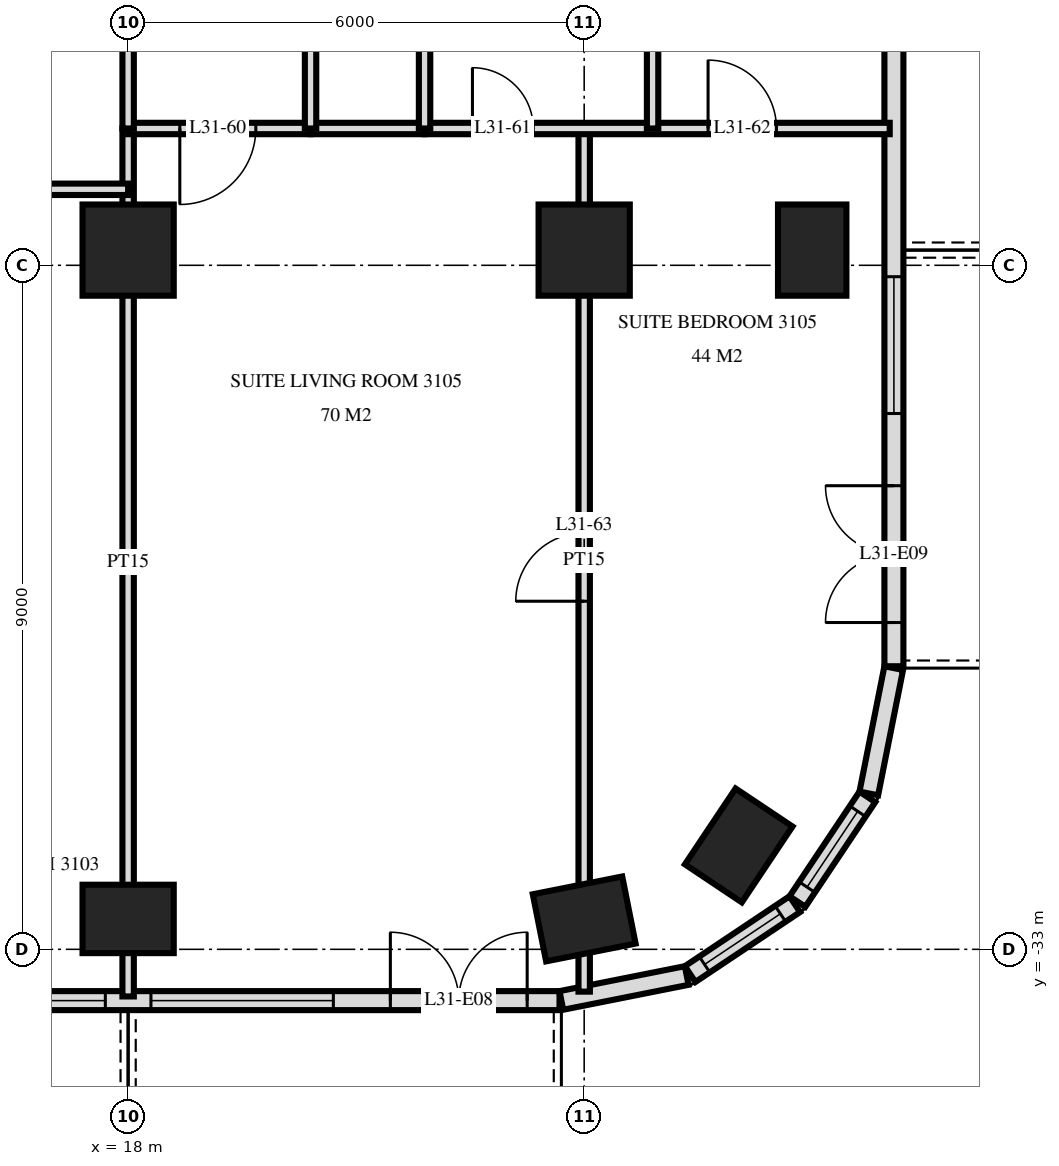
"""IFC4 building model, lengths in metres.
Left out: names, types, materials, properties, quantities, classifications, styles, units other than length and angle.
Written with IfcOpenShell. Run it as: python <this file> out.ifc"""

import sys

from ifc_helpers import new_model, si_unit, direction, frame, frame_2d, origin, origin_2d, place, context, subcontext, project, spatial, rectangle, extrude, element, fill, save


model = new_model("IFC4")
c1 = context("Model", 3, precision=1e-05, world=origin(), true_north=direction((0.0, 1.0)))
c2 = subcontext(c1, "Body", "Model", "MODEL_VIEW")
j1 = project(units=[si_unit("LENGTHUNIT", "METRE"), si_unit("PLANEANGLEUNIT", "RADIAN")], contexts=[c1])
p1 = place(None, origin())
s1 = spatial("IfcSite", under=j1, at=p1, CompositionType="ELEMENT")
p2 = place(p1, origin())
s2 = spatial("IfcBuilding", under=s1, at=p2, CompositionType="ELEMENT")
p3 = place(p2, frame((0.0, 0.0, 123.6)))
s3 = spatial("IfcBuildingStorey", under=s2, at=p3, CompositionType="ELEMENT", Elevation=123.6)
p4 = place(p3, frame((18.0, -32.6, 0.0), z_axis=(0.0, 0.0, 1.0), x_axis=(1.0, 0.0, 0.0)))
e1 = element("IfcColumn", 1, at=p4, inside=s3, PredefinedType="COLUMN", context=c2, shape_type="SweptSolid", body=[
    extrude(rectangle(XDim=1.2, YDim=0.9, at=origin_2d()), origin(), (0.0, 0.0, 1.0), 3.6),
])
p5 = place(p3, frame((18.0, -23.8, 0.0), z_axis=(0.0, 0.0, 1.0), x_axis=(1.0, 0.0, 0.0)))
e2 = element("IfcColumn", 2, at=p5, inside=s3, PredefinedType="COLUMN", context=c2, shape_type="SweptSolid", body=[
    extrude(rectangle(XDim=1.2, YDim=1.2, at=origin_2d()), origin(), (0.0, 0.0, 1.0), 3.6),
])
p6 = place(p3, frame((24.0, -32.6, 0.0), z_axis=(0.0, 0.0, 1.0), x_axis=(0.980792089743, 0.195056086032, 0.0)))
e3 = element("IfcColumn", 3, at=p6, inside=s3, PredefinedType="COLUMN", context=c2, shape_type="SweptSolid", body=[
    extrude(rectangle(XDim=1.2, YDim=0.9, at=origin_2d()), origin(), (0.0, 0.0, 1.0), 3.6),
])
p7 = place(p3, frame((24.0, -23.8, 0.0), z_axis=(0.0, 0.0, 1.0), x_axis=(1.0, 0.0, 0.0)))
e4 = element("IfcColumn", 4, at=p7, inside=s3, PredefinedType="COLUMN", context=c2, shape_type="SweptSolid", body=[
    extrude(rectangle(XDim=1.2, YDim=1.2, at=origin_2d()), origin(), (0.0, 0.0, 1.0), 3.6),
])
for number, where, z_axis, x_axis in (
    (5, (26.033, -31.633, 0.0), (0.0, 0.0, 1.0), (0.556, 0.831, 0.0)),
    (6, (27.0, -23.8, 0.0), (0.0, 0.0, 1.0), (0.0, 1.0, 0.0)),
):
    element("IfcColumn", number, at=place(p3, frame(where, z_axis=z_axis, x_axis=x_axis)), inside=s3, PredefinedType="COLUMN", context=c2, shape_type="SweptSolid", body=[
        extrude(rectangle(XDim=1.2, YDim=0.9, at=origin_2d()), origin(), (0.0, 0.0, 1.0), 3.6),
    ])
p8 = place(p3, frame((-23.675, -33.675, 0.0), z_axis=(0.0, 0.0, 1.0), x_axis=(1.0, 0.0, 0.0)))
e7 = element("IfcWall", 7, at=p8, inside=s3, PredefinedType="SOLIDWALL", context=c2, shape_type="SweptSolid", body=[
    extrude(rectangle(XDim=47.351, YDim=0.25, at=frame_2d((23.675, 0.0))), origin(), (0.0, 0.0, 1.0), 3.32),
])
p9 = place(p8, frame((3.425, 0.0, 0.0)))
e8 = element("IfcOpeningElement", 8, at=p9, cuts=e7, PredefinedType="OPENING", context=c2, shape_type="SweptSolid", body=[
    extrude(rectangle(XDim=1.8, YDim=2.4, at=frame_2d((0.9, 1.2))), frame((0.0, 0.135, 0.0), z_axis=(0.0, -1.0, 0.0), x_axis=(1.0, 0.0, 0.0)), (0.0, 0.0, 1.0), 0.27),
])
p10 = place(p8, frame((6.275, 0.0, 0.0)))
e9 = element("IfcOpeningElement", 9, at=p10, cuts=e7, PredefinedType="OPENING", context=c2, shape_type="SweptSolid", body=[
    extrude(rectangle(XDim=1.8, YDim=2.4, at=frame_2d((0.9, 1.2))), frame((0.0, 0.135, 0.0), z_axis=(0.0, -1.0, 0.0), x_axis=(1.0, 0.0, 0.0)), (0.0, 0.0, 1.0), 0.27),
])
p11 = place(p8, frame((8.975, 0.0, 0.3)))
e10 = element("IfcOpeningElement", 10, at=p11, cuts=e7, PredefinedType="OPENING", context=c2, shape_type="SweptSolid", body=[
    extrude(rectangle(XDim=2.4, YDim=2.1, at=frame_2d((1.2, 1.05))), frame((0.0, 0.135, 0.0), z_axis=(0.0, -1.0, 0.0), x_axis=(1.0, 0.0, 0.0)), (0.0, 0.0, 1.0), 0.27),
])
p12 = place(p8, frame((12.275, 0.0, 0.0)))
e11 = element("IfcOpeningElement", 11, at=p12, cuts=e7, PredefinedType="OPENING", context=c2, shape_type="SweptSolid", body=[
    extrude(rectangle(XDim=1.8, YDim=2.4, at=frame_2d((0.9, 1.2))), frame((0.0, 0.135, 0.0), z_axis=(0.0, -1.0, 0.0), x_axis=(1.0, 0.0, 0.0)), (0.0, 0.0, 1.0), 0.27),
])
p13 = place(p8, frame((14.975, 0.0, 0.3)))
e12 = element("IfcOpeningElement", 12, at=p13, cuts=e7, PredefinedType="OPENING", context=c2, shape_type="SweptSolid", body=[
    extrude(rectangle(XDim=2.4, YDim=2.1, at=frame_2d((1.2, 1.05))), frame((0.0, 0.135, 0.0), z_axis=(0.0, -1.0, 0.0), x_axis=(1.0, 0.0, 0.0)), (0.0, 0.0, 1.0), 0.27),
])
p14 = place(p8, frame((17.975, 0.0, 0.3)))
e13 = element("IfcOpeningElement", 13, at=p14, cuts=e7, PredefinedType="OPENING", context=c2, shape_type="SweptSolid", body=[
    extrude(rectangle(XDim=2.4, YDim=2.1, at=frame_2d((1.2, 1.05))), frame((0.0, 0.135, 0.0), z_axis=(0.0, -1.0, 0.0), x_axis=(1.0, 0.0, 0.0)), (0.0, 0.0, 1.0), 0.27),
])
p15 = place(p8, frame((21.275, 0.0, 0.0)))
e14 = element("IfcOpeningElement", 14, at=p15, cuts=e7, PredefinedType="OPENING", context=c2, shape_type="SweptSolid", body=[
    extrude(rectangle(XDim=1.8, YDim=2.4, at=frame_2d((0.9, 1.2))), frame((0.0, 0.135, 0.0), z_axis=(0.0, -1.0, 0.0), x_axis=(1.0, 0.0, 0.0)), (0.0, 0.0, 1.0), 0.27),
])
p16 = place(p8, frame((24.275, 0.0, 0.0)))
e15 = element("IfcOpeningElement", 15, at=p16, cuts=e7, PredefinedType="OPENING", context=c2, shape_type="SweptSolid", body=[
    extrude(rectangle(XDim=1.8, YDim=2.4, at=frame_2d((0.9, 1.2))), frame((0.0, 0.135, 0.0), z_axis=(0.0, -1.0, 0.0), x_axis=(1.0, 0.0, 0.0)), (0.0, 0.0, 1.0), 0.27),
])
p17 = place(p8, frame((26.975, 0.0, 0.3)))
e16 = element("IfcOpeningElement", 16, at=p17, cuts=e7, PredefinedType="OPENING", context=c2, shape_type="SweptSolid", body=[
    extrude(rectangle(XDim=2.4, YDim=2.1, at=frame_2d((1.2, 1.05))), frame((0.0, 0.135, 0.0), z_axis=(0.0, -1.0, 0.0), x_axis=(1.0, 0.0, 0.0)), (0.0, 0.0, 1.0), 0.27),
])
p18 = place(p8, frame((30.275, 0.0, 0.0)))
e17 = element("IfcOpeningElement", 17, at=p18, cuts=e7, PredefinedType="OPENING", context=c2, shape_type="SweptSolid", body=[
    extrude(rectangle(XDim=1.8, YDim=2.4, at=frame_2d((0.9, 1.2))), frame((0.0, 0.135, 0.0), z_axis=(0.0, -1.0, 0.0), x_axis=(1.0, 0.0, 0.0)), (0.0, 0.0, 1.0), 0.27),
])
p19 = place(p8, frame((32.975, 0.0, 0.3)))
e18 = element("IfcOpeningElement", 18, at=p19, cuts=e7, PredefinedType="OPENING", context=c2, shape_type="SweptSolid", body=[
    extrude(rectangle(XDim=2.4, YDim=2.1, at=frame_2d((1.2, 1.05))), frame((0.0, 0.135, 0.0), z_axis=(0.0, -1.0, 0.0), x_axis=(1.0, 0.0, 0.0)), (0.0, 0.0, 1.0), 0.27),
])
p20 = place(p8, frame((36.275, 0.0, 0.0)))
e19 = element("IfcOpeningElement", 19, at=p20, cuts=e7, PredefinedType="OPENING", context=c2, shape_type="SweptSolid", body=[
    extrude(rectangle(XDim=1.8, YDim=2.4, at=frame_2d((0.9, 1.2))), frame((0.0, 0.135, 0.0), z_axis=(0.0, -1.0, 0.0), x_axis=(1.0, 0.0, 0.0)), (0.0, 0.0, 1.0), 0.27),
])
p21 = place(p8, frame((38.975, 0.0, 0.3)))
e20 = element("IfcOpeningElement", 20, at=p21, cuts=e7, PredefinedType="OPENING", context=c2, shape_type="SweptSolid", body=[
    extrude(rectangle(XDim=2.4, YDim=2.1, at=frame_2d((1.2, 1.05))), frame((0.0, 0.135, 0.0), z_axis=(0.0, -1.0, 0.0), x_axis=(1.0, 0.0, 0.0)), (0.0, 0.0, 1.0), 0.27),
])
p22 = place(p8, frame((41.975, 0.0, 0.3)))
e21 = element("IfcOpeningElement", 21, at=p22, cuts=e7, PredefinedType="OPENING", context=c2, shape_type="SweptSolid", body=[
    extrude(rectangle(XDim=2.4, YDim=2.1, at=frame_2d((1.2, 1.05))), frame((0.0, 0.135, 0.0), z_axis=(0.0, -1.0, 0.0), x_axis=(1.0, 0.0, 0.0)), (0.0, 0.0, 1.0), 0.27),
])
p23 = place(p8, frame((45.125, 0.0, 0.0)))
e22 = element("IfcOpeningElement", 22, at=p23, cuts=e7, PredefinedType="OPENING", context=c2, shape_type="SweptSolid", body=[
    extrude(rectangle(XDim=1.8, YDim=2.4, at=frame_2d((0.9, 1.2))), frame((0.0, 0.135, 0.0), z_axis=(0.0, -1.0, 0.0), x_axis=(1.0, 0.0, 0.0)), (0.0, 0.0, 1.0), 0.27),
])
p24 = place(p3, frame((23.7, -33.673, 0.0), z_axis=(0.0, 0.0, 1.0), x_axis=(0.980775640221, 0.19513878023, 0.0)))
e23 = element("IfcWall", 23, at=p24, inside=s3, PredefinedType="SOLIDWALL", context=c2, shape_type="SweptSolid", body=[
    extrude(rectangle(XDim=1.681, YDim=0.25, at=frame_2d((0.841, 0.0))), origin(), (0.0, 0.0, 1.0), 3.32),
])
p25 = place(p3, frame((25.394, -33.326, 0.0), z_axis=(0.0, 0.0, 1.0), x_axis=(0.831482937015, 0.55555029066, 0.0)))
e24 = element("IfcWall", 24, at=p25, inside=s3, PredefinedType="SOLIDWALL", context=c2, shape_type="SweptSolid", body=[
    extrude(rectangle(XDim=1.656, YDim=0.25, at=frame_2d((0.828, 0.0))), origin(), (0.0, 0.0, 1.0), 3.32),
])
p26 = place(p25, frame((0.228, 0.0, 0.9)))
e25 = element("IfcOpeningElement", 25, at=p26, cuts=e24, PredefinedType="OPENING", context=c2, shape_type="SweptSolid", body=[
    extrude(rectangle(XDim=1.2, YDim=1.5, at=frame_2d((0.6, 0.75))), frame((0.0, 0.135, 0.0), z_axis=(0.0, -1.0, 0.0), x_axis=(1.0, 0.0, 0.0)), (0.0, 0.0, 1.0), 0.27),
])
p27 = place(p3, frame((26.806, -32.371, 0.0), z_axis=(0.0, 0.0, 1.0), x_axis=(0.55555029066, 0.831482937015, 0.0)))
e26 = element("IfcWall", 26, at=p27, inside=s3, PredefinedType="SOLIDWALL", context=c2, shape_type="SweptSolid", body=[
    extrude(rectangle(XDim=1.656, YDim=0.25, at=frame_2d((0.828, 0.0))), origin(), (0.0, 0.0, 1.0), 3.32),
])
p28 = place(p27, frame((0.228, 0.0, 0.9)))
e27 = element("IfcOpeningElement", 27, at=p28, cuts=e26, PredefinedType="OPENING", context=c2, shape_type="SweptSolid", body=[
    extrude(rectangle(XDim=1.2, YDim=1.5, at=frame_2d((0.6, 0.75))), frame((0.0, 0.135, 0.0), z_axis=(0.0, -1.0, 0.0), x_axis=(1.0, 0.0, 0.0)), (0.0, 0.0, 1.0), 0.27),
])
p29 = place(p3, frame((27.745, -30.949, 0.0), z_axis=(0.0, 0.0, 1.0), x_axis=(0.194999110559, 0.980803419081, 0.0)))
e28 = element("IfcWall", 28, at=p29, inside=s3, PredefinedType="SOLIDWALL", context=c2, shape_type="SweptSolid", body=[
    extrude(rectangle(XDim=1.681, YDim=0.25, at=frame_2d((0.841, 0.0))), origin(), (0.0, 0.0, 1.0), 3.32),
])
p30 = place(p3, frame((28.075, -29.275, 0.0), z_axis=(0.0, 0.0, 1.0), x_axis=(0.0, 1.0, 0.0)))
e29 = element("IfcWall", 29, at=p30, inside=s3, PredefinedType="SOLIDWALL", context=c2, shape_type="SweptSolid", body=[
    extrude(rectangle(XDim=25.951, YDim=0.25, at=frame_2d((12.975, 0.0))), origin(), (0.0, 0.0, 1.0), 3.32),
])
p31 = place(p30, frame((0.575, 0.0, 0.0)))
e30 = element("IfcOpeningElement", 30, at=p31, cuts=e29, PredefinedType="OPENING", context=c2, shape_type="SweptSolid", body=[
    extrude(rectangle(XDim=1.8, YDim=2.4, at=frame_2d((0.9, 1.2))), frame((0.0, 0.135, 0.0), z_axis=(0.0, -1.0, 0.0), x_axis=(1.0, 0.0, 0.0)), (0.0, 0.0, 1.0), 0.27),
])
p32 = place(p30, frame((3.325, 0.0, 0.3)))
e31 = element("IfcOpeningElement", 31, at=p32, cuts=e29, PredefinedType="OPENING", context=c2, shape_type="SweptSolid", body=[
    extrude(rectangle(XDim=1.8, YDim=2.1, at=frame_2d((0.9, 1.05))), frame((0.0, 0.135, 0.0), z_axis=(0.0, -1.0, 0.0), x_axis=(1.0, 0.0, 0.0)), (0.0, 0.0, 1.0), 0.27),
])
p33 = place(p30, frame((8.275, 0.0, 0.0)))
e32 = element("IfcOpeningElement", 32, at=p33, cuts=e29, PredefinedType="OPENING", context=c2, shape_type="SweptSolid", body=[
    extrude(rectangle(XDim=1.8, YDim=2.4, at=frame_2d((0.9, 1.2))), frame((0.0, 0.135, 0.0), z_axis=(0.0, -1.0, 0.0), x_axis=(1.0, 0.0, 0.0)), (0.0, 0.0, 1.0), 0.27),
])
p34 = place(p30, frame((12.175, 0.0, 0.3)))
e33 = element("IfcOpeningElement", 33, at=p34, cuts=e29, PredefinedType="OPENING", context=c2, shape_type="SweptSolid", body=[
    extrude(rectangle(XDim=1.2, YDim=2.1, at=frame_2d((0.6, 1.05))), frame((0.0, 0.135, 0.0), z_axis=(0.0, -1.0, 0.0), x_axis=(1.0, 0.0, 0.0)), (0.0, 0.0, 1.0), 0.27),
])
p35 = place(p30, frame((16.375, 0.0, 0.0)))
e34 = element("IfcOpeningElement", 34, at=p35, cuts=e29, PredefinedType="OPENING", context=c2, shape_type="SweptSolid", body=[
    extrude(rectangle(XDim=1.8, YDim=2.4, at=frame_2d((0.9, 1.2))), frame((0.0, 0.135, 0.0), z_axis=(0.0, -1.0, 0.0), x_axis=(1.0, 0.0, 0.0)), (0.0, 0.0, 1.0), 0.27),
])
p36 = place(p3, frame((24.9, -22.2, 0.0), z_axis=(0.0, 0.0, 1.0), x_axis=(0.0, 1.0, 0.0)))
e35 = element("IfcWall", 35, at=p36, inside=s3, PredefinedType="PARTITIONING", context=c2, shape_type="SweptSolid", body=[
    extrude(rectangle(XDim=4.2, YDim=0.15, at=frame_2d((2.1, 0.0))), origin(), (0.0, 0.0, 1.0), 3.32),
])
p37 = place(p3, frame((24.0, -33.557, 0.0), z_axis=(0.0, 0.0, 1.0), x_axis=(0.0, 1.0, 0.0)))
e36 = element("IfcWall", 36, at=p37, inside=s3, PredefinedType="PARTITIONING", context=c2, shape_type="SweptSolid", body=[
    extrude(rectangle(XDim=11.357, YDim=0.15, at=frame_2d((5.678, 0.0))), origin(), (0.0, 0.0, 1.0), 3.32),
])
p38 = place(p37, frame((5.137, 0.0, 0.0)))
e37 = element("IfcOpeningElement", 37, at=p38, cuts=e36, PredefinedType="OPENING", context=c2, shape_type="SweptSolid", body=[
    extrude(rectangle(XDim=0.9, YDim=2.1, at=frame_2d((0.45, 1.05))), frame((0.0, 0.085, 0.0), z_axis=(0.0, -1.0, 0.0), x_axis=(1.0, 0.0, 0.0)), (0.0, 0.0, 1.0), 0.17),
])
p39 = place(p3, frame((21.9, -22.2, 0.0), z_axis=(0.0, 0.0, 1.0), x_axis=(0.0, 1.0, 0.0)))
e38 = element("IfcWall", 38, at=p39, inside=s3, PredefinedType="PLUMBINGWALL", context=c2, shape_type="SweptSolid", body=[
    extrude(rectangle(XDim=4.2, YDim=0.15, at=frame_2d((2.1, 0.0))), origin(), (0.0, 0.0, 1.0), 3.32),
])
p40 = place(p3, frame((20.4, -22.2, 0.0), z_axis=(0.0, 0.0, 1.0), x_axis=(0.0, 1.0, 0.0)))
e39 = element("IfcWall", 39, at=p40, inside=s3, PredefinedType="PARTITIONING", context=c2, shape_type="SweptSolid", body=[
    extrude(rectangle(XDim=4.2, YDim=0.15, at=frame_2d((2.1, 0.0))), origin(), (0.0, 0.0, 1.0), 3.32),
])
p41 = place(p40, frame((1.6, 0.0, 0.0)))
e40 = element("IfcOpeningElement", 40, at=p41, cuts=e39, PredefinedType="OPENING", context=c2, shape_type="SweptSolid", body=[
    extrude(rectangle(XDim=1.0, YDim=2.1, at=frame_2d((0.5, 1.05))), frame((0.0, 0.085, 0.0), z_axis=(0.0, -1.0, 0.0), x_axis=(1.0, 0.0, 0.0)), (0.0, 0.0, 1.0), 0.17),
])
p42 = place(p3, frame((18.0, -22.2, 0.0), z_axis=(0.0, 0.0, 1.0), x_axis=(0.0, 1.0, 0.0)))
e41 = element("IfcWall", 41, at=p42, inside=s3, PredefinedType="PARTITIONING", context=c2, shape_type="SweptSolid", body=[
    extrude(rectangle(XDim=4.2, YDim=0.15, at=frame_2d((2.1, 0.0))), origin(), (0.0, 0.0, 1.0), 3.32),
])
p43 = place(p3, frame((18.0, -33.62, 0.0), z_axis=(0.0, 0.0, 1.0), x_axis=(0.0, 1.0, 0.0)))
e42 = element("IfcWall", 42, at=p43, inside=s3, PredefinedType="PARTITIONING", context=c2, shape_type="SweptSolid", body=[
    extrude(rectangle(XDim=11.42, YDim=0.15, at=frame_2d((5.71, 0.0))), origin(), (0.0, 0.0, 1.0), 3.32),
])
p44 = place(p3, frame((16.3, -23.0, 0.0), z_axis=(0.0, 0.0, 1.0), x_axis=(1.0, 0.0, 0.0)))
e43 = element("IfcWall", 43, at=p44, inside=s3, PredefinedType="PARTITIONING", context=c2, shape_type="SweptSolid", body=[
    extrude(rectangle(XDim=1.7, YDim=0.15, at=frame_2d((0.85, 0.0))), origin(), (0.0, 0.0, 1.0), 3.32),
])
p45 = place(p3, frame((18.0, -22.2, 0.0), z_axis=(0.0, 0.0, 1.0), x_axis=(1.0, 0.0, 0.0)))
e44 = element("IfcWall", 44, at=p45, inside=s3, PredefinedType="PARTITIONING", context=c2, shape_type="SweptSolid", body=[
    extrude(rectangle(XDim=2.4, YDim=0.15, at=frame_2d((1.2, 0.0))), origin(), (0.0, 0.0, 1.0), 3.32),
])
p46 = place(p45, frame((0.68, 0.0, 0.0)))
e45 = element("IfcOpeningElement", 45, at=p46, cuts=e44, PredefinedType="OPENING", context=c2, shape_type="SweptSolid", body=[
    extrude(rectangle(XDim=1.0, YDim=2.1, at=frame_2d((0.5, 1.05))), frame((0.0, 0.085, 0.0), z_axis=(0.0, -1.0, 0.0), x_axis=(1.0, 0.0, 0.0)), (0.0, 0.0, 1.0), 0.17),
])
p47 = place(p3, frame((21.9, -22.2, 0.0), z_axis=(0.0, 0.0, 1.0), x_axis=(1.0, 0.0, 0.0)))
e46 = element("IfcWall", 46, at=p47, inside=s3, PredefinedType="PARTITIONING", context=c2, shape_type="SweptSolid", body=[
    extrude(rectangle(XDim=6.12, YDim=0.15, at=frame_2d((3.06, 0.0))), origin(), (0.0, 0.0, 1.0), 3.32),
])
p48 = place(p47, frame((0.63, 0.0, 0.0)))
e47 = element("IfcOpeningElement", 47, at=p48, cuts=e46, PredefinedType="OPENING", context=c2, shape_type="SweptSolid", body=[
    extrude(rectangle(XDim=0.8, YDim=2.1, at=frame_2d((0.4, 1.05))), frame((0.0, 0.085, 0.0), z_axis=(0.0, -1.0, 0.0), x_axis=(1.0, 0.0, 0.0)), (0.0, 0.0, 1.0), 0.17),
])
p49 = place(p47, frame((3.73, 0.0, 0.0)))
e48 = element("IfcOpeningElement", 48, at=p49, cuts=e46, PredefinedType="OPENING", context=c2, shape_type="SweptSolid", body=[
    extrude(rectangle(XDim=0.9, YDim=2.1, at=frame_2d((0.45, 1.05))), frame((0.0, 0.085, 0.0), z_axis=(0.0, -1.0, 0.0), x_axis=(1.0, 0.0, 0.0)), (0.0, 0.0, 1.0), 0.17),
])
p50 = place(p3, frame((20.4, -22.2, 0.0), z_axis=(0.0, 0.0, 1.0), x_axis=(1.0, 0.0, 0.0)))
e49 = element("IfcWall", 49, at=p50, inside=s3, PredefinedType="PLUMBINGWALL", context=c2, shape_type="SweptSolid", body=[
    extrude(rectangle(XDim=1.5, YDim=0.15, at=frame_2d((0.75, 0.0))), origin(), (0.0, 0.0, 1.0), 3.32),
])
p51 = place(p26, origin())
e50 = element("IfcWindow", 50, at=p51, inside=s3, PartitioningType="SINGLE_PANEL", PredefinedType="WINDOW", context=c2, shape_type="SweptSolid", body=[
    extrude(rectangle(XDim=1.2, YDim=1.5, at=frame_2d((0.6, 0.75))), frame((0.0, 0.03, 0.0), z_axis=(0.0, -1.0, 0.0), x_axis=(1.0, 0.0, 0.0)), (0.0, 0.0, 1.0), 0.06),
])
fill(e25, e50)
p52 = place(p28, origin())
e51 = element("IfcWindow", 51, at=p52, inside=s3, PartitioningType="SINGLE_PANEL", PredefinedType="WINDOW", context=c2, shape_type="SweptSolid", body=[
    extrude(rectangle(XDim=1.2, YDim=1.5, at=frame_2d((0.6, 0.75))), frame((0.0, 0.03, 0.0), z_axis=(0.0, -1.0, 0.0), x_axis=(1.0, 0.0, 0.0)), (0.0, 0.0, 1.0), 0.06),
])
fill(e27, e51)
p53 = place(p21, origin())
e52 = element("IfcWindow", 52, at=p53, inside=s3, PartitioningType="SINGLE_PANEL", PredefinedType="WINDOW", context=c2, shape_type="SweptSolid", body=[
    extrude(rectangle(XDim=2.4, YDim=2.1, at=frame_2d((1.2, 1.05))), frame((0.0, 0.03, 0.0), z_axis=(0.0, -1.0, 0.0), x_axis=(1.0, 0.0, 0.0)), (0.0, 0.0, 1.0), 0.06),
])
fill(e20, e52)
p54 = place(p22, origin())
e53 = element("IfcWindow", 53, at=p54, inside=s3, PartitioningType="SINGLE_PANEL", PredefinedType="WINDOW", context=c2, shape_type="SweptSolid", body=[
    extrude(rectangle(XDim=2.4, YDim=2.1, at=frame_2d((1.2, 1.05))), frame((0.0, 0.03, 0.0), z_axis=(0.0, -1.0, 0.0), x_axis=(1.0, 0.0, 0.0)), (0.0, 0.0, 1.0), 0.06),
])
fill(e21, e53)
p55 = place(p23, origin())
e54 = element("IfcDoor", 54, at=p55, inside=s3, OperationType="DOUBLE_DOOR_SINGLE_SWING", PredefinedType="DOOR", context=c2, shape_type="SweptSolid", body=[
    extrude(rectangle(XDim=1.8, YDim=2.4, at=frame_2d((0.9, 1.2))), frame((0.0, 0.025, 0.0), z_axis=(0.0, -1.0, 0.0), x_axis=(1.0, 0.0, 0.0)), (0.0, 0.0, 1.0), 0.05),
])
fill(e22, e54)
p56 = place(p31, origin())
e55 = element("IfcDoor", 55, at=p56, inside=s3, OperationType="DOUBLE_DOOR_SINGLE_SWING", PredefinedType="DOOR", context=c2, shape_type="SweptSolid", body=[
    extrude(rectangle(XDim=1.8, YDim=2.4, at=frame_2d((0.9, 1.2))), frame((0.0, 0.025, 0.0), z_axis=(0.0, -1.0, 0.0), x_axis=(1.0, 0.0, 0.0)), (0.0, 0.0, 1.0), 0.05),
])
fill(e30, e55)
p57 = place(p32, origin())
e56 = element("IfcWindow", 56, at=p57, inside=s3, PartitioningType="SINGLE_PANEL", PredefinedType="WINDOW", context=c2, shape_type="SweptSolid", body=[
    extrude(rectangle(XDim=1.8, YDim=2.1, at=frame_2d((0.9, 1.05))), frame((0.0, 0.03, 0.0), z_axis=(0.0, -1.0, 0.0), x_axis=(1.0, 0.0, 0.0)), (0.0, 0.0, 1.0), 0.06),
])
fill(e31, e56)
p58 = place(p46, frame((0.5, 0.0, 0.0), z_axis=(0.0, 0.0, 1.0), x_axis=(-1.0, 0.0, 0.0)))
e57 = element("IfcDoor", 57, at=p58, inside=s3, OperationType="SINGLE_SWING_LEFT", PredefinedType="DOOR", context=c2, shape_type="SweptSolid", body=[
    extrude(rectangle(XDim=1.0, YDim=2.1, at=frame_2d((0.0, 1.05))), frame((0.0, -0.025, 0.0), z_axis=(0.0, 1.0, 0.0), x_axis=(-1.0, 0.0, 0.0)), (0.0, 0.0, 1.0), 0.05),
])
fill(e45, e57)
p59 = place(p48, origin())
e58 = element("IfcDoor", 58, at=p59, inside=s3, OperationType="SINGLE_SWING_RIGHT", PredefinedType="DOOR", context=c2, shape_type="SweptSolid", body=[
    extrude(rectangle(XDim=0.8, YDim=2.1, at=frame_2d((0.4, 1.05))), frame((0.0, 0.025, 0.0), z_axis=(0.0, -1.0, 0.0), x_axis=(1.0, 0.0, 0.0)), (0.0, 0.0, 1.0), 0.05),
])
fill(e47, e58)
p60 = place(p49, origin())
e59 = element("IfcDoor", 59, at=p60, inside=s3, OperationType="SINGLE_SWING_RIGHT", PredefinedType="DOOR", context=c2, shape_type="SweptSolid", body=[
    extrude(rectangle(XDim=0.9, YDim=2.1, at=frame_2d((0.45, 1.05))), frame((0.0, 0.025, 0.0), z_axis=(0.0, -1.0, 0.0), x_axis=(1.0, 0.0, 0.0)), (0.0, 0.0, 1.0), 0.05),
])
fill(e48, e59)
p61 = place(p38, origin())
e60 = element("IfcDoor", 60, at=p61, inside=s3, OperationType="SINGLE_SWING_RIGHT", PredefinedType="DOOR", context=c2, shape_type="SweptSolid", body=[
    extrude(rectangle(XDim=0.9, YDim=2.1, at=frame_2d((0.45, 1.05))), frame((0.0, 0.025, 0.0), z_axis=(0.0, -1.0, 0.0), x_axis=(1.0, 0.0, 0.0)), (0.0, 0.0, 1.0), 0.05),
])
fill(e37, e60)
save(model, sys.argv[1])
